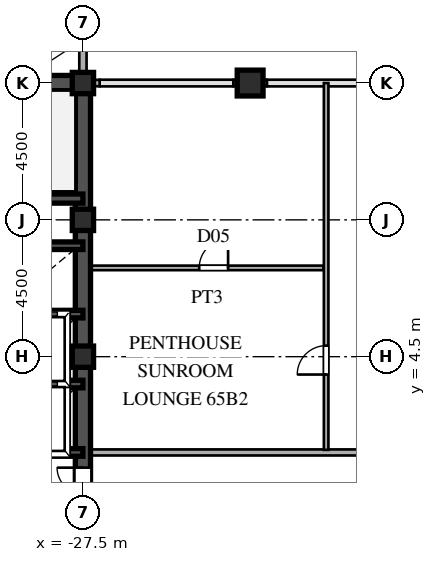
"""IFC4 building model, lengths in metres.
Left out: names, types, materials, properties, quantities, classifications, styles, units other than length and angle.
Written with IfcOpenShell. Run it as: python <this file> out.ifc"""

import sys

from ifc_helpers import new_model, si_unit, direction, frame, frame_2d, origin, origin_2d, place, context, subcontext, project, spatial, rectangle, hollow_rectangle, extrude, source, transform, mapped, element, fill, save


model = new_model("IFC4")
c1 = context("Model", 3, precision=1e-05, world=origin(), true_north=direction((0.0, 1.0)))
c2 = subcontext(c1, "Body", "Model", "MODEL_VIEW")
j1 = project(units=[si_unit("LENGTHUNIT", "METRE"), si_unit("PLANEANGLEUNIT", "RADIAN")], contexts=[c1])
p1 = place(None, origin())
s1 = spatial("IfcSite", under=j1, at=p1, CompositionType="ELEMENT")
p2 = place(p1, origin())
s2 = spatial("IfcBuilding", under=s1, at=p2, CompositionType="ELEMENT")
p3 = place(p2, frame((0.0, 0.0, 246.9)))
s3 = spatial("IfcBuildingStorey", under=s2, at=p3, CompositionType="ELEMENT", Elevation=246.9)
m1 = source(origin(), c2, "Body", "SweptSolid", [
    extrude(hollow_rectangle(XDim=0.7, YDim=0.7, WallThickness=0.03, at=origin_2d()), origin(), (0.0, 0.0, 1.0), 3.75),
])
for number, where, z_axis, x_axis in (
    (1, (-27.5, 4.5, 0.0), (0.0, 0.0, 1.0), (1.0, 0.0, 0.0)),
    (2, (-27.5, 9.0, 0.0), (0.0, 0.0, 1.0), (1.0, 0.0, 0.0)),
    (3, (-27.5, 13.5, 0.0), (0.0, 0.0, 1.0), (1.0, 0.0, 0.0)),
):
    element("IfcColumn", number, at=place(p3, frame(where, z_axis=z_axis, x_axis=x_axis)), inside=s3, PredefinedType="COLUMN", context=c2, shape_type="MappedRepresentation", body=[
        mapped(m1, transform((0.0, 0.0, 0.0), scale=1.0)),
    ])
m2 = source(origin(), c2, "Body", "SweptSolid", [
    extrude(hollow_rectangle(XDim=0.85, YDim=0.85, WallThickness=0.036, at=origin_2d()), origin(), (0.0, 0.0, 1.0), 3.75),
])
p4 = place(p3, frame((-22.0, 13.5, 0.0), z_axis=(0.0, 0.0, 1.0), x_axis=(1.0, 0.0, 0.0)))
e4 = element("IfcColumn", 4, at=p4, inside=s3, PredefinedType="COLUMN", context=c2, shape_type="MappedRepresentation", body=[
    mapped(m2, transform((0.0, 0.0, 0.0), scale=1.0)),
])
p5 = place(p3, frame((-27.5, 13.755, 0.0), z_axis=(0.0, 0.0, 1.0), x_axis=(0.0, 1.0, 0.0)))
e5 = element("IfcWall", 5, at=p5, inside=s3, PredefinedType="SOLIDWALL", context=c2, shape_type="SweptSolid", body=[
    extrude(rectangle(XDim=0.62, YDim=0.24, at=frame_2d((0.31, 0.0))), origin(), (0.0, 0.0, 1.0), 3.03),
])
p6 = place(p3, frame((-27.5, 14.375, 0.0), z_axis=(0.0, 0.0, 1.0), x_axis=(0.0, 1.0, 0.0)))
e6 = element("IfcWall", 6, at=p6, inside=s3, PredefinedType="SOLIDWALL", context=c2, shape_type="SweptSolid", body=[
    extrude(rectangle(XDim=1.605, YDim=0.24, at=frame_2d((0.803, 0.0))), origin(), (0.0, 0.0, 1.0), 3.53),
])
p7 = place(p3, frame((-27.49, 13.5, 0.0), z_axis=(0.0, 0.0, 1.0), x_axis=(1.0, 0.0, 0.0)))
e7 = element("IfcWall", 7, at=p7, inside=s3, PredefinedType="SOLIDWALL", context=c2, shape_type="SweptSolid", body=[
    extrude(rectangle(XDim=0.54, YDim=0.21, at=frame_2d((0.27, 0.0))), origin(), (0.0, 0.0, 1.0), 3.03),
])
p8 = place(p3, frame((-22.55, 13.5, 0.0), z_axis=(0.0, 0.0, 1.0), x_axis=(1.0, 0.0, 0.0)))
e8 = element("IfcWall", 8, at=p8, inside=s3, PredefinedType="SOLIDWALL", context=c2, shape_type="SweptSolid", body=[
    extrude(rectangle(XDim=1.1, YDim=0.21, at=frame_2d((0.55, 0.0))), origin(), (0.0, 0.0, 1.0), 3.03),
])
p9 = place(p3, frame((-27.5, 1.3, 0.0), z_axis=(0.0, 0.0, 1.0), x_axis=(0.0, 1.0, 0.0)))
e9 = element("IfcWall", 9, at=p9, inside=s3, PredefinedType="SHEAR", context=c2, shape_type="SweptSolid", body=[
    extrude(rectangle(XDim=12.2, YDim=0.5, at=frame_2d((6.1, 0.0))), origin(), (0.0, 0.0, 1.0), 3.53),
])
p10 = place(p3, frame((-27.5, -1.3, 0.0), z_axis=(0.0, 0.0, 1.0), x_axis=(0.0, 1.0, 0.0)))
e10 = element("IfcWall", 10, at=p10, inside=s3, PredefinedType="SHEAR", context=c2, shape_type="SweptSolid", body=[
    extrude(rectangle(XDim=2.6, YDim=0.5, at=frame_2d((1.3, 0.0))), origin(), (0.0, 0.0, 1.0), 3.53),
])
p11 = place(p10, frame((0.45, 0.0, 0.0)))
e11 = element("IfcOpeningElement", 11, at=p11, cuts=e10, PredefinedType="OPENING", context=c2, shape_type="SweptSolid", body=[
    extrude(rectangle(XDim=1.7, YDim=2.35, at=frame_2d((0.85, 1.175))), frame((0.0, 0.26, 0.0), z_axis=(0.0, -1.0, 0.0), x_axis=(1.0, 0.0, 0.0)), (0.0, 0.0, 1.0), 0.52),
])
p12 = place(p3, frame((-36.5, 13.5, 0.0), z_axis=(0.0, 0.0, 1.0), x_axis=(1.0, 0.0, 0.0)))
e12 = element("IfcWall", 12, at=p12, inside=s3, PredefinedType="SHEAR", context=c2, shape_type="SweptSolid", body=[
    extrude(rectangle(XDim=9.0, YDim=0.5, at=frame_2d((4.5, 0.0))), origin(), (0.0, 0.0, 1.0), 3.53),
])
p13 = place(p3, frame((-36.5, 9.7, 0.0), z_axis=(0.0, 0.0, 1.0), x_axis=(1.0, 0.0, 0.0)))
e13 = element("IfcWall", 13, at=p13, inside=s3, PredefinedType="SHEAR", context=c2, shape_type="SweptSolid", body=[
    extrude(rectangle(XDim=9.0, YDim=0.3, at=frame_2d((4.5, 0.0))), origin(), (0.0, 0.0, 1.0), 3.53),
])
p14 = place(p13, frame((0.6, 0.0, 0.0)))
e14 = element("IfcOpeningElement", 14, at=p14, cuts=e13, PredefinedType="OPENING", context=c2, shape_type="SweptSolid", body=[
    extrude(rectangle(XDim=1.1, YDim=2.2, at=frame_2d((0.55, 1.1))), frame((0.0, 0.16, 0.0), z_axis=(0.0, -1.0, 0.0), x_axis=(1.0, 0.0, 0.0)), (0.0, 0.0, 1.0), 0.32),
])
for number, where, z_axis, x_axis in (
    (15, (-30.3, 1.35, 0.0), (0.0, 0.0, 1.0), (1.0, 0.0, 0.0)),
    (16, (-30.3, 3.6, 0.0), (0.0, 0.0, 1.0), (1.0, 0.0, 0.0)),
    (17, (-30.3, 5.9, 0.0), (0.0, 0.0, 1.0), (1.0, 0.0, 0.0)),
    (18, (-30.3, 8.15, 0.0), (0.0, 0.0, 1.0), (1.0, 0.0, 0.0)),
):
    element("IfcWall", number, at=place(p3, frame(where, z_axis=z_axis, x_axis=x_axis)), inside=s3, PredefinedType="SHEAR", context=c2, shape_type="SweptSolid", body=[
        extrude(rectangle(XDim=2.8, YDim=0.25, at=frame_2d((1.4, 0.0))), origin(), (0.0, 0.0, 1.0), 3.53),
    ])
p15 = place(p3, frame((-27.245, 1.35, 0.0), z_axis=(0.0, 0.0, 1.0), x_axis=(1.0, 0.0, 0.0)))
e19 = element("IfcWall", 19, at=p15, inside=s3, PredefinedType="PARTITIONING", context=c2, shape_type="SweptSolid", body=[
    extrude(rectangle(XDim=54.49, YDim=0.2, at=frame_2d((27.245, 0.0))), origin(), (0.0, 0.0, 1.0), 3.53),
])
p16 = place(p15, frame((24.97, 0.0, 0.0)))
e20 = element("IfcOpeningElement", 20, at=p16, cuts=e19, PredefinedType="OPENING", context=c2, shape_type="SweptSolid", body=[
    extrude(rectangle(XDim=1.05, YDim=2.25, at=frame_2d((0.525, 1.125))), frame((0.0, 0.11, 0.0), z_axis=(0.0, -1.0, 0.0), x_axis=(1.0, 0.0, 0.0)), (0.0, 0.0, 1.0), 0.22),
])
p17 = place(p3, frame((-27.245, 7.42, 0.0), z_axis=(0.0, 0.0, 1.0), x_axis=(1.0, 0.0, 0.0)))
e21 = element("IfcWall", 21, at=p17, inside=s3, PredefinedType="PARTITIONING", context=c2, shape_type="SweptSolid", body=[
    extrude(rectangle(XDim=7.66, YDim=0.15, at=frame_2d((3.83, 0.0))), origin(), (0.0, 0.0, 1.0), 3.53),
])
p18 = place(p17, frame((3.57, 0.0, 0.0)))
e22 = element("IfcOpeningElement", 22, at=p18, cuts=e21, PredefinedType="OPENING", context=c2, shape_type="SweptSolid", body=[
    extrude(rectangle(XDim=0.95, YDim=2.15, at=frame_2d((0.475, 1.075))), frame((0.0, 0.085, 0.0), z_axis=(0.0, -1.0, 0.0), x_axis=(1.0, 0.0, 0.0)), (0.0, 0.0, 1.0), 0.17),
])
p19 = place(p3, frame((-19.5, 1.435, 0.0), z_axis=(0.0, 0.0, 1.0), x_axis=(0.0, 1.0, 0.0)))
e23 = element("IfcWall", 23, at=p19, inside=s3, PredefinedType="PARTITIONING", context=c2, shape_type="SweptSolid", body=[
    extrude(rectangle(XDim=12.065, YDim=0.15, at=frame_2d((6.032, 0.0))), origin(), (0.0, 0.0, 1.0), 3.53),
])
p20 = place(p19, frame((2.478, 0.0, 0.0)))
e24 = element("IfcOpeningElement", 24, at=p20, cuts=e23, PredefinedType="OPENING", context=c2, shape_type="SweptSolid", body=[
    extrude(rectangle(XDim=0.95, YDim=2.15, at=frame_2d((0.475, 1.075))), frame((0.0, 0.085, 0.0), z_axis=(0.0, -1.0, 0.0), x_axis=(1.0, 0.0, 0.0)), (0.0, 0.0, 1.0), 0.17),
])
m3 = source(origin(), c2, "Body", "SweptSolid", [
    extrude(rectangle(XDim=1.7, YDim=2.35, at=frame_2d((0.85, 1.175))), frame((0.0, 0.025, 0.0), z_axis=(0.0, -1.0, 0.0), x_axis=(1.0, 0.0, 0.0)), (0.0, 0.0, 1.0), 0.05),
])
p21 = place(p11, origin())
e25 = element("IfcDoor", 25, at=p21, inside=s3, OperationType="DOUBLE_SWING_LEFT", PredefinedType="DOOR", context=c2, shape_type="MappedRepresentation", body=[
    mapped(m3, transform((0.0, 0.0, 0.0), scale=1.0)),
])
fill(e11, e25)
m4 = source(origin(), c2, "Body", "SweptSolid", [
    extrude(rectangle(XDim=0.95, YDim=2.15, at=frame_2d((0.475, 1.075))), frame((0.0, 0.025, 0.0), z_axis=(0.0, -1.0, 0.0), x_axis=(1.0, 0.0, 0.0)), (0.0, 0.0, 1.0), 0.05),
])
p22 = place(p18, origin())
e26 = element("IfcDoor", 26, at=p22, inside=s3, OperationType="SINGLE_SWING_RIGHT", PredefinedType="DOOR", context=c2, shape_type="MappedRepresentation", body=[
    mapped(m4, transform((0.0, 0.0, 0.0), scale=1.0)),
])
fill(e22, e26)
p23 = place(p20, origin())
e27 = element("IfcDoor", 27, at=p23, inside=s3, OperationType="SINGLE_SWING_LEFT", PredefinedType="DOOR", context=c2, shape_type="MappedRepresentation", body=[
    mapped(m4, transform((0.0, 0.0, 0.0), scale=1.0)),
])
fill(e24, e27)
save(model, sys.argv[1])
